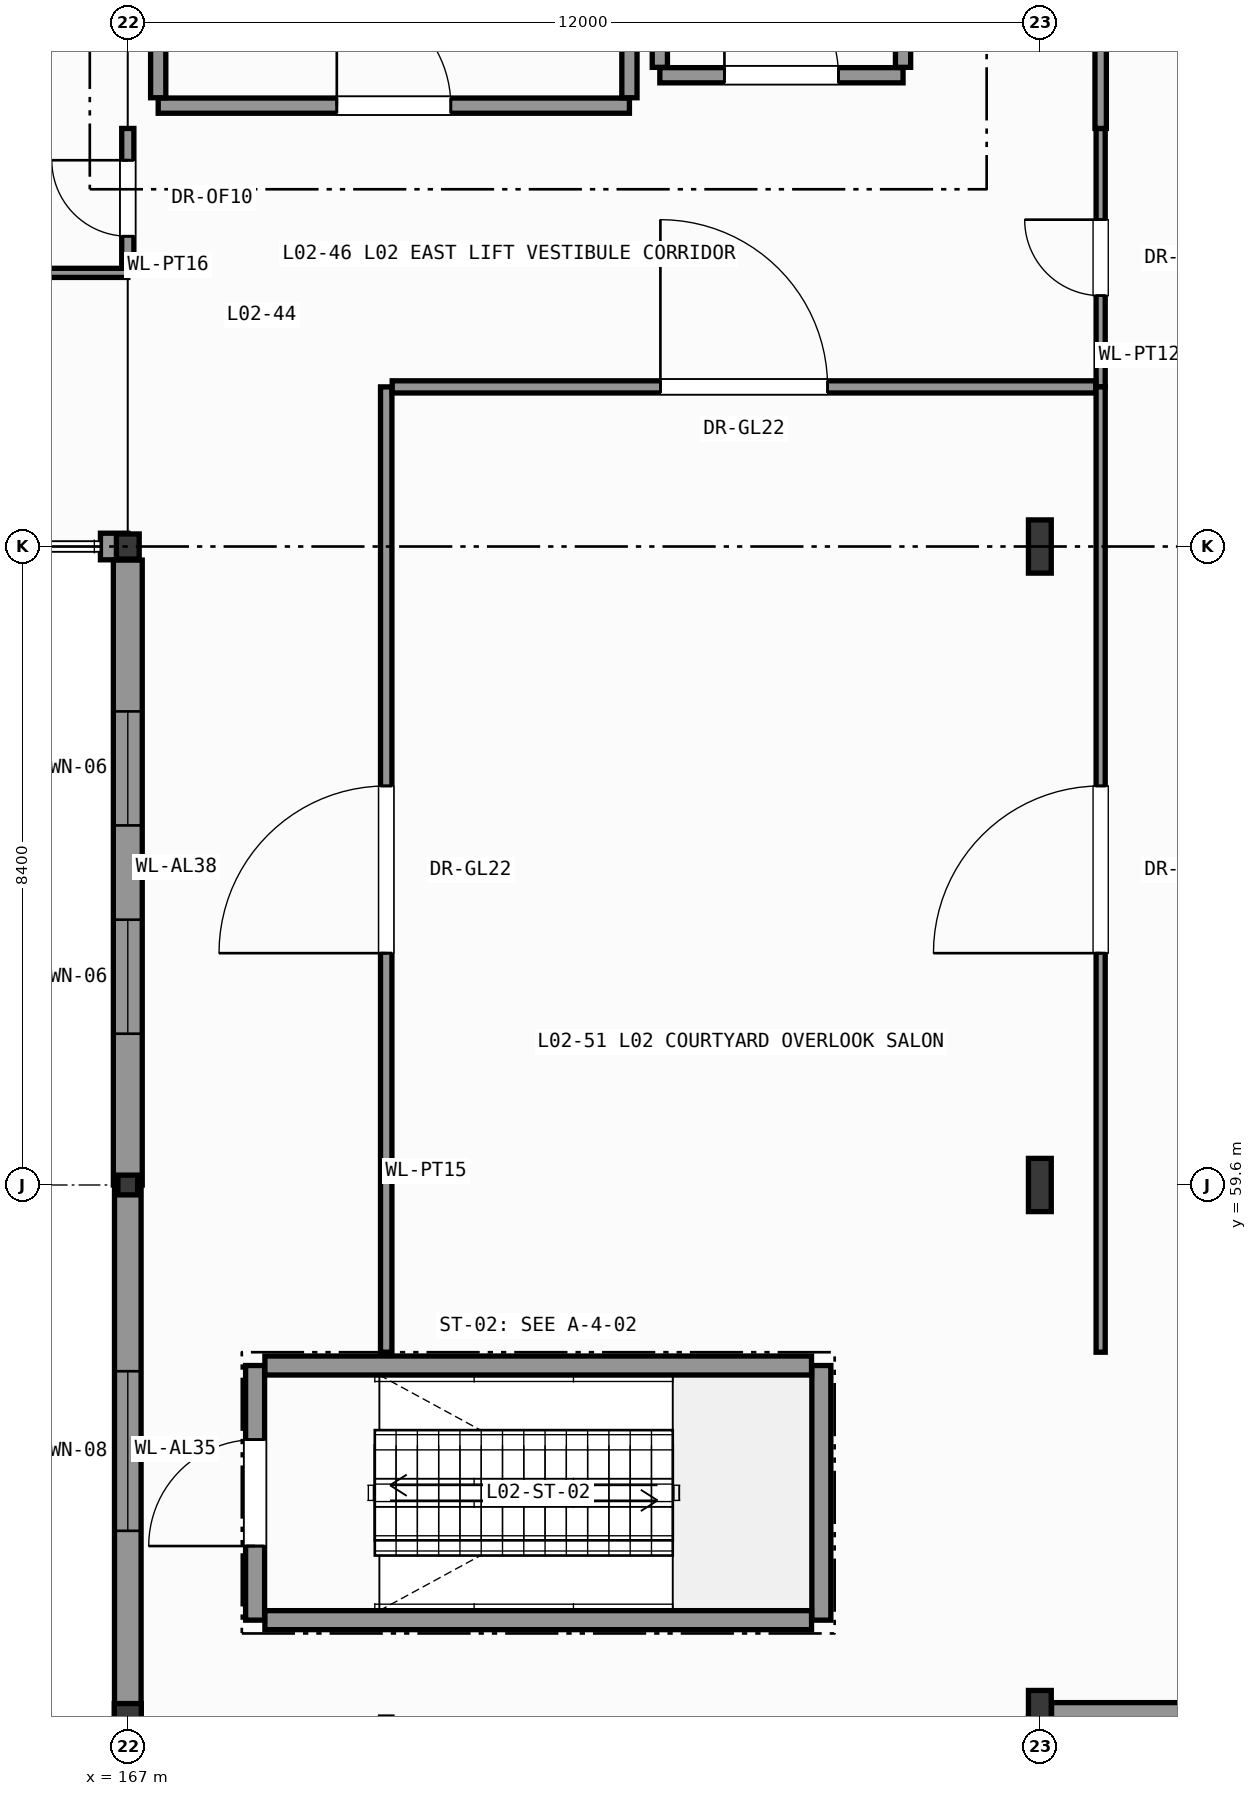
"""IFC4 building model, lengths in metres.
Left out: names, types, materials, properties, quantities, classifications, styles, units other than length and angle.
Written with IfcOpenShell. Run it as: python <this file> out.ifc"""

import sys

from ifc_helpers import new_model, si_unit, direction, frame, frame_2d, origin, origin_2d, place, context, subcontext, project, spatial, rectangle, hollow_rectangle, hollow_circle, i_section, extrude, element, fill, save


model = new_model("IFC4")
c1 = context("Model", 3, precision=1e-05, world=origin(), true_north=direction((0.0, 1.0)))
c2 = subcontext(c1, "Body", "Model", "MODEL_VIEW")
j1 = project(units=[si_unit("LENGTHUNIT", "METRE"), si_unit("PLANEANGLEUNIT", "RADIAN")], contexts=[c1])
p1 = place(None, origin())
s1 = spatial("IfcSite", under=j1, at=p1, CompositionType="ELEMENT")
p2 = place(p1, origin())
s2 = spatial("IfcBuilding", under=s1, at=p2, CompositionType="ELEMENT")
p3 = place(p2, frame((0.0, 0.0, 7.8)))
s3 = spatial("IfcBuildingStorey", under=s2, at=p3, CompositionType="ELEMENT", Elevation=7.8)
p4 = place(p3, frame((167.0, 52.6, 0.0), z_axis=(0.0, 0.0, 1.0), x_axis=(1.0, 0.0, 0.0)))
e1 = element("IfcColumn", 1, at=p4, inside=s3, PredefinedType="COLUMN", context=c2, shape_type="SweptSolid", body=[
    extrude(hollow_circle(Radius=0.178, WallThickness=0.016, at=origin_2d()), origin(), (0.0, 0.0, 1.0), 5.4),
])
p5 = place(p3, frame((167.0, 59.6, 0.0), z_axis=(0.0, 0.0, 1.0), x_axis=(1.0, 0.0, 0.0)))
e2 = element("IfcColumn", 2, at=p5, inside=s3, PredefinedType="COLUMN", context=c2, shape_type="SweptSolid", body=[
    extrude(hollow_rectangle(XDim=0.26, YDim=0.26, WallThickness=0.012, InnerFilletRadius=0.012, OuterFilletRadius=0.025, at=origin_2d()), origin(), (0.0, 0.0, 1.0), 5.4),
])
p6 = place(p3, frame((167.0, 68.0, 0.0), z_axis=(0.0, 0.0, 1.0), x_axis=(1.0, 0.0, 0.0)))
e3 = element("IfcColumn", 3, at=p6, inside=s3, PredefinedType="COLUMN", context=c2, shape_type="SweptSolid", body=[
    extrude(i_section(OverallWidth=0.3, OverallDepth=0.33, WebThickness=0.01, FlangeThickness=0.017, FilletRadius=0.027, at=origin_2d()), origin(), (0.0, 0.0, 1.0), 5.4),
])
for number, where, z_axis, x_axis in (
    (4, (179.0, 52.6, 0.0), (0.0, 0.0, 1.0), (1.0, 0.0, 0.0)),
    (5, (179.0, 59.6, 0.0), (0.0, 0.0, 1.0), (1.0, 0.0, 0.0)),
    (6, (179.0, 68.0, 0.0), (0.0, 0.0, 1.0), (1.0, 0.0, 0.0)),
):
    element("IfcColumn", number, at=place(p3, frame(where, z_axis=z_axis, x_axis=x_axis)), inside=s3, PredefinedType="COLUMN", context=c2, shape_type="SweptSolid", body=[
        extrude(i_section(OverallWidth=0.3, OverallDepth=0.7, WebThickness=0.017, FlangeThickness=0.032, FilletRadius=0.027, at=origin_2d()), origin(), (0.0, 0.0, 1.0), 5.4),
    ])
p7 = place(p3, frame((166.64, 68.0, 0.0), z_axis=(0.0, 0.0, 1.0), x_axis=(1.0, 0.0, 0.0)))
e7 = element("IfcWall", 7, at=p7, inside=s3, PredefinedType="SOLIDWALL", context=c2, shape_type="SweptSolid", body=[
    extrude(rectangle(XDim=0.36, YDim=0.35, at=frame_2d((0.18, 0.0))), origin(), (0.0, 0.0, 1.0), 4.505),
])
p8 = place(p3, frame((167.0, 59.6, 0.0), z_axis=(0.0, 0.0, 1.0), x_axis=(0.0, 1.0, 0.0)))
e8 = element("IfcWall", 8, at=p8, inside=s3, PredefinedType="SOLIDWALL", context=c2, shape_type="SweptSolid", body=[
    extrude(rectangle(XDim=8.221, YDim=0.38, at=frame_2d((4.11, 0.0))), origin(), (0.0, 0.0, 1.0), 4.665),
])
p9 = place(p8, frame((1.99, 0.0, 0.95)))
e9 = element("IfcOpeningElement", 9, at=p9, cuts=e8, PredefinedType="OPENING", context=c2, shape_type="SweptSolid", body=[
    extrude(rectangle(XDim=1.5, YDim=2.4, at=frame_2d((0.75, 1.2))), frame((0.0, 0.2, 0.0), z_axis=(0.0, -1.0, 0.0), x_axis=(1.0, 0.0, 0.0)), (0.0, 0.0, 1.0), 0.4),
])
p10 = place(p8, frame((4.731, 0.0, 0.95)))
e10 = element("IfcOpeningElement", 10, at=p10, cuts=e8, PredefinedType="OPENING", context=c2, shape_type="SweptSolid", body=[
    extrude(rectangle(XDim=1.5, YDim=2.4, at=frame_2d((0.75, 1.2))), frame((0.0, 0.2, 0.0), z_axis=(0.0, -1.0, 0.0), x_axis=(1.0, 0.0, 0.0)), (0.0, 0.0, 1.0), 0.4),
])
p11 = place(p3, frame((167.0, 52.6, 0.0), z_axis=(0.0, 0.0, 1.0), x_axis=(0.0, 1.0, 0.0)))
e11 = element("IfcWall", 11, at=p11, inside=s3, PredefinedType="SOLIDWALL", context=c2, shape_type="SweptSolid", body=[
    extrude(rectangle(XDim=7.0, YDim=0.35, at=frame_2d((3.5, 0.0))), origin(), (0.0, 0.0, 1.0), 4.815),
])
p12 = place(p11, frame((2.45, 0.0, 0.95)))
e12 = element("IfcOpeningElement", 12, at=p12, cuts=e11, PredefinedType="OPENING", context=c2, shape_type="SweptSolid", body=[
    extrude(rectangle(XDim=2.1, YDim=2.8, at=frame_2d((1.05, 1.4))), frame((0.0, 0.185, 0.0), z_axis=(0.0, -1.0, 0.0), x_axis=(1.0, 0.0, 0.0)), (0.0, 0.0, 1.0), 0.37),
])
p13 = place(p3, frame((187.088, 52.6, 0.0), z_axis=(0.0, 0.0, 1.0), x_axis=(-1.0, 0.0, 0.0)))
e13 = element("IfcWall", 13, at=p13, inside=s3, PredefinedType="SOLIDWALL", context=c2, shape_type="SweptSolid", body=[
    extrude(rectangle(XDim=7.934, YDim=0.38, at=frame_2d((3.967, 0.0))), origin(), (0.0, 0.0, 1.0), 3.705),
])
p14 = place(p3, frame((168.675, 53.875, 0.0), z_axis=(0.0, 0.0, 1.0), x_axis=(0.0, 1.0, 0.0)))
e14 = element("IfcWall", 14, at=p14, inside=s3, PredefinedType="SHEAR", context=c2, shape_type="SweptSolid", body=[
    extrude(rectangle(XDim=3.35, YDim=0.25, at=frame_2d((1.675, 0.0))), origin(), (0.0, 0.0, 1.0), 5.15),
])
p15 = place(p14, frame((0.975, 0.0, 0.0)))
e15 = element("IfcOpeningElement", 15, at=p15, cuts=e14, PredefinedType="OPENING", context=c2, shape_type="SweptSolid", body=[
    extrude(rectangle(XDim=1.4, YDim=2.2, at=frame_2d((0.7, 1.1))), frame((0.0, 0.135, 0.0), z_axis=(0.0, -1.0, 0.0), x_axis=(1.0, 0.0, 0.0)), (0.0, 0.0, 1.0), 0.27),
])
p16 = place(p3, frame((176.125, 53.875, 0.0), z_axis=(0.0, 0.0, 1.0), x_axis=(0.0, 1.0, 0.0)))
e16 = element("IfcWall", 16, at=p16, inside=s3, PredefinedType="SHEAR", context=c2, shape_type="SweptSolid", body=[
    extrude(rectangle(XDim=3.35, YDim=0.25, at=frame_2d((1.675, 0.0))), origin(), (0.0, 0.0, 1.0), 5.15),
])
for number, where, z_axis, x_axis in (
    (17, (168.804, 53.875, 0.0), (0.0, 0.0, 1.0), (1.0, 0.0, 0.0)),
    (18, (168.804, 57.225, 0.0), (0.0, 0.0, 1.0), (1.0, 0.0, 0.0)),
):
    element("IfcWall", number, at=place(p3, frame(where, z_axis=z_axis, x_axis=x_axis)), inside=s3, PredefinedType="SHEAR", context=c2, shape_type="SweptSolid", body=[
        extrude(rectangle(XDim=7.192, YDim=0.25, at=frame_2d((3.596, 0.0))), origin(), (0.0, 0.0, 1.0), 5.15),
    ])
p17 = place(p3, frame((167.4, 73.8, 0.0), z_axis=(0.0, 0.0, 1.0), x_axis=(1.0, 0.0, 0.0)))
e19 = element("IfcWall", 19, at=p17, inside=s3, PredefinedType="PARTITIONING", context=c2, shape_type="SweptSolid", body=[
    extrude(rectangle(XDim=6.2, YDim=0.2, at=frame_2d((3.1, 0.0))), origin(), (0.0, 0.0, 1.0), 4.745),
])
p18 = place(p17, frame((2.35, 0.0, 0.0)))
e20 = element("IfcOpeningElement", 20, at=p18, cuts=e19, PredefinedType="OPENING", context=c2, shape_type="SweptSolid", body=[
    extrude(rectangle(XDim=1.5, YDim=2.2, at=frame_2d((0.75, 1.1))), frame((0.0, 0.11, 0.0), z_axis=(0.0, -1.0, 0.0), x_axis=(1.0, 0.0, 0.0)), (0.0, 0.0, 1.0), 0.22),
])
for number, where, z_axis, x_axis in (
    (21, (167.4, 73.904, 0.0), (0.0, 0.0, 1.0), (0.0, 1.0, 0.0)),
    (22, (173.6, 73.904, 0.0), (0.0, 0.0, 1.0), (0.0, 1.0, 0.0)),
):
    element("IfcWall", number, at=place(p3, frame(where, z_axis=z_axis, x_axis=x_axis)), inside=s3, PredefinedType="PARTITIONING", context=c2, shape_type="SweptSolid", body=[
        extrude(rectangle(XDim=4.296, YDim=0.2, at=frame_2d((2.148, 0.0))), origin(), (0.0, 0.0, 1.0), 5.15),
    ])
p19 = place(p3, frame((174.0, 74.2, 0.0), z_axis=(0.0, 0.0, 1.0), x_axis=(1.0, 0.0, 0.0)))
e23 = element("IfcWall", 23, at=p19, inside=s3, PredefinedType="PARTITIONING", context=c2, shape_type="SweptSolid", body=[
    extrude(rectangle(XDim=3.2, YDim=0.2, at=frame_2d((1.6, 0.0))), origin(), (0.0, 0.0, 1.0), 5.15),
])
p20 = place(p19, frame((0.85, 0.0, 0.0)))
e24 = element("IfcOpeningElement", 24, at=p20, cuts=e23, PredefinedType="OPENING", context=c2, shape_type="SweptSolid", body=[
    extrude(rectangle(XDim=1.5, YDim=2.2, at=frame_2d((0.75, 1.1))), frame((0.0, 0.11, 0.0), z_axis=(0.0, -1.0, 0.0), x_axis=(1.0, 0.0, 0.0)), (0.0, 0.0, 1.0), 0.22),
])
for number, where, z_axis, x_axis in (
    (25, (174.0, 74.304, 0.0), (0.0, 0.0, 1.0), (0.0, 1.0, 0.0)),
    (26, (177.2, 74.304, 0.0), (0.0, 0.0, 1.0), (0.0, 1.0, 0.0)),
):
    element("IfcWall", number, at=place(p3, frame(where, z_axis=z_axis, x_axis=x_axis)), inside=s3, PredefinedType="PARTITIONING", context=c2, shape_type="SweptSolid", body=[
        extrude(rectangle(XDim=3.896, YDim=0.2, at=frame_2d((1.948, 0.0))), origin(), (0.0, 0.0, 1.0), 5.15),
    ])
p21 = place(p3, frame((126.0, 71.6, 0.0), z_axis=(0.0, 0.0, 1.0), x_axis=(1.0, 0.0, 0.0)))
e27 = element("IfcWall", 27, at=p21, inside=s3, PredefinedType="PARTITIONING", context=c2, shape_type="SweptSolid", body=[
    extrude(rectangle(XDim=41.0, YDim=0.12, at=frame_2d((20.5, 0.0))), origin(), (0.0, 0.0, 1.0), 5.15),
])
p22 = place(p21, frame((19.4, 0.0, 0.0)))
e28 = element("IfcOpeningElement", 28, at=p22, cuts=e27, PredefinedType="OPENING", context=c2, shape_type="SweptSolid", body=[
    extrude(rectangle(XDim=2.2, YDim=2.6, at=frame_2d((1.1, 1.3))), frame((0.0, 0.07, 0.0), z_axis=(0.0, -1.0, 0.0), x_axis=(1.0, 0.0, 0.0)), (0.0, 0.0, 1.0), 0.14),
])
p23 = place(p3, frame((167.0, 71.664, 0.0), z_axis=(0.0, 0.0, 1.0), x_axis=(0.0, 1.0, 0.0)))
e29 = element("IfcWall", 29, at=p23, inside=s3, PredefinedType="PARTITIONING", context=c2, shape_type="SweptSolid", body=[
    extrude(rectangle(XDim=1.836, YDim=0.16, at=frame_2d((0.918, 0.0))), origin(), (0.0, 0.0, 1.0), 4.665),
])
p24 = place(p23, frame((0.418, 0.0, 0.0)))
e30 = element("IfcOpeningElement", 30, at=p24, cuts=e29, PredefinedType="OPENING", context=c2, shape_type="SweptSolid", body=[
    extrude(rectangle(XDim=1.0, YDim=2.15, at=frame_2d((0.5, 1.075))), frame((0.0, 0.09, 0.0), z_axis=(0.0, -1.0, 0.0), x_axis=(1.0, 0.0, 0.0)), (0.0, 0.0, 1.0), 0.18),
])
p25 = place(p3, frame((170.4, 57.4, 0.0), z_axis=(0.0, 0.0, 1.0), x_axis=(0.0, 1.0, 0.0)))
e31 = element("IfcWall", 31, at=p25, inside=s3, PredefinedType="PARTITIONING", context=c2, shape_type="SweptSolid", body=[
    extrude(rectangle(XDim=12.7, YDim=0.15, at=frame_2d((6.35, 0.0))), origin(), (0.0, 0.0, 1.0), 5.15),
])
p26 = place(p25, frame((5.25, 0.0, 0.0)))
e32 = element("IfcOpeningElement", 32, at=p26, cuts=e31, PredefinedType="OPENING", context=c2, shape_type="SweptSolid", body=[
    extrude(rectangle(XDim=2.2, YDim=2.6, at=frame_2d((1.1, 1.3))), frame((0.0, 0.085, 0.0), z_axis=(0.0, -1.0, 0.0), x_axis=(1.0, 0.0, 0.0)), (0.0, 0.0, 1.0), 0.17),
])
p27 = place(p3, frame((179.8, 70.1, 0.0), z_axis=(0.0, 0.0, 1.0), x_axis=(0.0, 1.0, 0.0)))
e33 = element("IfcWall", 33, at=p27, inside=s3, PredefinedType="PARTITIONING", context=c2, shape_type="SweptSolid", body=[
    extrude(rectangle(XDim=3.4, YDim=0.12, at=frame_2d((1.7, 0.0))), origin(), (0.0, 0.0, 1.0), 5.15),
])
p28 = place(p27, frame((1.2, 0.0, 0.0)))
e34 = element("IfcOpeningElement", 34, at=p28, cuts=e33, PredefinedType="OPENING", context=c2, shape_type="SweptSolid", body=[
    extrude(rectangle(XDim=1.0, YDim=2.15, at=frame_2d((0.5, 1.075))), frame((0.0, 0.07, 0.0), z_axis=(0.0, -1.0, 0.0), x_axis=(1.0, 0.0, 0.0)), (0.0, 0.0, 1.0), 0.14),
])
p29 = place(p3, frame((170.479, 70.1, 0.0), z_axis=(0.0, 0.0, 1.0), x_axis=(1.0, 0.0, 0.0)))
e35 = element("IfcWall", 35, at=p29, inside=s3, PredefinedType="PARTITIONING", context=c2, shape_type="SweptSolid", body=[
    extrude(rectangle(XDim=9.257, YDim=0.16, at=frame_2d((4.628, 0.0))), origin(), (0.0, 0.0, 1.0), 5.15),
])
p30 = place(p29, frame((3.529, 0.0, 0.0)))
e36 = element("IfcOpeningElement", 36, at=p30, cuts=e35, PredefinedType="OPENING", context=c2, shape_type="SweptSolid", body=[
    extrude(rectangle(XDim=2.2, YDim=2.6, at=frame_2d((1.1, 1.3))), frame((0.0, 0.09, 0.0), z_axis=(0.0, -1.0, 0.0), x_axis=(1.0, 0.0, 0.0)), (0.0, 0.0, 1.0), 0.18),
])
p31 = place(p3, frame((179.8, 73.5, 0.0), z_axis=(0.0, 0.0, 1.0), x_axis=(0.0, 1.0, 0.0)))
e37 = element("IfcWall", 37, at=p31, inside=s3, PredefinedType="PARTITIONING", context=c2, shape_type="SweptSolid", body=[
    extrude(rectangle(XDim=8.3, YDim=0.15, at=frame_2d((4.15, 0.0))), origin(), (0.0, 0.0, 1.0), 5.15),
])
p32 = place(p31, frame((4.31, 0.0, 0.0)))
e38 = element("IfcOpeningElement", 38, at=p32, cuts=e37, PredefinedType="OPENING", context=c2, shape_type="SweptSolid", body=[
    extrude(rectangle(XDim=2.2, YDim=2.6, at=frame_2d((1.1, 1.3))), frame((0.0, 0.085, 0.0), z_axis=(0.0, -1.0, 0.0), x_axis=(1.0, 0.0, 0.0)), (0.0, 0.0, 1.0), 0.17),
])
p33 = place(p3, frame((179.8, 57.4, 0.0), z_axis=(0.0, 0.0, 1.0), x_axis=(0.0, 1.0, 0.0)))
e39 = element("IfcWall", 39, at=p33, inside=s3, PredefinedType="PARTITIONING", context=c2, shape_type="SweptSolid", body=[
    extrude(rectangle(XDim=12.7, YDim=0.12, at=frame_2d((6.35, 0.0))), origin(), (0.0, 0.0, 1.0), 5.15),
])
p34 = place(p33, frame((5.25, 0.0, 0.0)))
e40 = element("IfcOpeningElement", 40, at=p34, cuts=e39, PredefinedType="OPENING", context=c2, shape_type="SweptSolid", body=[
    extrude(rectangle(XDim=2.2, YDim=2.6, at=frame_2d((1.1, 1.3))), frame((0.0, 0.07, 0.0), z_axis=(0.0, -1.0, 0.0), x_axis=(1.0, 0.0, 0.0)), (0.0, 0.0, 1.0), 0.14),
])
p35 = place(p3, frame((170.4, 15.2, 0.0), z_axis=(0.0, 0.0, 1.0), x_axis=(0.0, 1.0, 0.0)))
e41 = element("IfcWall", 41, at=p35, inside=s3, PredefinedType="PARTITIONING", context=c2, shape_type="SweptSolid", body=[
    extrude(rectangle(XDim=37.4, YDim=0.15, at=frame_2d((18.7, 0.0))), origin(), (0.0, 0.0, 1.0), 5.15),
])
p36 = place(p35, frame((17.6, 0.0, 0.0)))
e42 = element("IfcOpeningElement", 42, at=p36, cuts=e41, PredefinedType="OPENING", context=c2, shape_type="SweptSolid", body=[
    extrude(rectangle(XDim=2.2, YDim=2.6, at=frame_2d((1.1, 1.3))), frame((0.0, 0.085, 0.0), z_axis=(0.0, -1.0, 0.0), x_axis=(1.0, 0.0, 0.0)), (0.0, 0.0, 1.0), 0.17),
])
p37 = place(p9, origin())
e43 = element("IfcWindow", 43, at=p37, inside=s3, PartitioningType="SINGLE_PANEL", PredefinedType="WINDOW", context=c2, shape_type="SweptSolid", body=[
    extrude(rectangle(XDim=1.5, YDim=2.4, at=frame_2d((0.75, 1.2))), frame((0.0, 0.03, 0.0), z_axis=(0.0, -1.0, 0.0), x_axis=(1.0, 0.0, 0.0)), (0.0, 0.0, 1.0), 0.06),
])
fill(e9, e43)
p38 = place(p10, origin())
e44 = element("IfcWindow", 44, at=p38, inside=s3, PartitioningType="SINGLE_PANEL", PredefinedType="WINDOW", context=c2, shape_type="SweptSolid", body=[
    extrude(rectangle(XDim=1.5, YDim=2.4, at=frame_2d((0.75, 1.2))), frame((0.0, 0.03, 0.0), z_axis=(0.0, -1.0, 0.0), x_axis=(1.0, 0.0, 0.0)), (0.0, 0.0, 1.0), 0.06),
])
fill(e10, e44)
p39 = place(p12, origin())
e45 = element("IfcWindow", 45, at=p39, inside=s3, PartitioningType="SINGLE_PANEL", PredefinedType="WINDOW", context=c2, shape_type="SweptSolid", body=[
    extrude(rectangle(XDim=2.1, YDim=2.8, at=frame_2d((1.05, 1.4))), frame((0.0, 0.03, 0.0), z_axis=(0.0, -1.0, 0.0), x_axis=(1.0, 0.0, 0.0)), (0.0, 0.0, 1.0), 0.06),
])
fill(e12, e45)
p40 = place(p15, origin())
e46 = element("IfcDoor", 46, at=p40, inside=s3, OperationType="SINGLE_SWING_LEFT", PredefinedType="DOOR", context=c2, shape_type="SweptSolid", body=[
    extrude(rectangle(XDim=1.4, YDim=2.2, at=frame_2d((0.7, 1.1))), frame((0.0, 0.025, 0.0), z_axis=(0.0, -1.0, 0.0), x_axis=(1.0, 0.0, 0.0)), (0.0, 0.0, 1.0), 0.05),
])
fill(e15, e46)
p41 = place(p18, origin())
e47 = element("IfcDoor", 47, at=p41, inside=s3, OperationType="SINGLE_SWING_LEFT", PredefinedType="DOOR", context=c2, shape_type="SweptSolid", body=[
    extrude(rectangle(XDim=1.5, YDim=2.2, at=frame_2d((0.75, 1.1))), frame((0.0, 0.025, 0.0), z_axis=(0.0, -1.0, 0.0), x_axis=(1.0, 0.0, 0.0)), (0.0, 0.0, 1.0), 0.05),
])
fill(e20, e47)
p42 = place(p20, origin())
e48 = element("IfcDoor", 48, at=p42, inside=s3, OperationType="SINGLE_SWING_LEFT", PredefinedType="DOOR", context=c2, shape_type="SweptSolid", body=[
    extrude(rectangle(XDim=1.5, YDim=2.2, at=frame_2d((0.75, 1.1))), frame((0.0, 0.025, 0.0), z_axis=(0.0, -1.0, 0.0), x_axis=(1.0, 0.0, 0.0)), (0.0, 0.0, 1.0), 0.05),
])
fill(e24, e48)
p43 = place(p24, origin())
e49 = element("IfcDoor", 49, at=p43, inside=s3, OperationType="SINGLE_SWING_RIGHT", PredefinedType="DOOR", context=c2, shape_type="SweptSolid", body=[
    extrude(rectangle(XDim=1.0, YDim=2.15, at=frame_2d((0.5, 1.075))), frame((0.0, 0.025, 0.0), z_axis=(0.0, -1.0, 0.0), x_axis=(1.0, 0.0, 0.0)), (0.0, 0.0, 1.0), 0.05),
])
fill(e30, e49)
p44 = place(p26, origin())
e50 = element("IfcDoor", 50, at=p44, inside=s3, OperationType="SINGLE_SWING_LEFT", PredefinedType="DOOR", context=c2, shape_type="SweptSolid", body=[
    extrude(rectangle(XDim=2.2, YDim=2.6, at=frame_2d((1.1, 1.3))), frame((0.0, 0.025, 0.0), z_axis=(0.0, -1.0, 0.0), x_axis=(1.0, 0.0, 0.0)), (0.0, 0.0, 1.0), 0.05),
])
fill(e32, e50)
p45 = place(p28, origin())
e51 = element("IfcDoor", 51, at=p45, inside=s3, OperationType="SINGLE_SWING_RIGHT", PredefinedType="DOOR", context=c2, shape_type="SweptSolid", body=[
    extrude(rectangle(XDim=1.0, YDim=2.15, at=frame_2d((0.5, 1.075))), frame((0.0, 0.025, 0.0), z_axis=(0.0, -1.0, 0.0), x_axis=(1.0, 0.0, 0.0)), (0.0, 0.0, 1.0), 0.05),
])
fill(e34, e51)
p46 = place(p30, origin())
e52 = element("IfcDoor", 52, at=p46, inside=s3, OperationType="SINGLE_SWING_LEFT", PredefinedType="DOOR", context=c2, shape_type="SweptSolid", body=[
    extrude(rectangle(XDim=2.2, YDim=2.6, at=frame_2d((1.1, 1.3))), frame((0.0, 0.025, 0.0), z_axis=(0.0, -1.0, 0.0), x_axis=(1.0, 0.0, 0.0)), (0.0, 0.0, 1.0), 0.05),
])
fill(e36, e52)
p47 = place(p34, origin())
e53 = element("IfcDoor", 53, at=p47, inside=s3, OperationType="SINGLE_SWING_LEFT", PredefinedType="DOOR", context=c2, shape_type="SweptSolid", body=[
    extrude(rectangle(XDim=2.2, YDim=2.6, at=frame_2d((1.1, 1.3))), frame((0.0, 0.025, 0.0), z_axis=(0.0, -1.0, 0.0), x_axis=(1.0, 0.0, 0.0)), (0.0, 0.0, 1.0), 0.05),
])
fill(e40, e53)
save(model, sys.argv[1])
